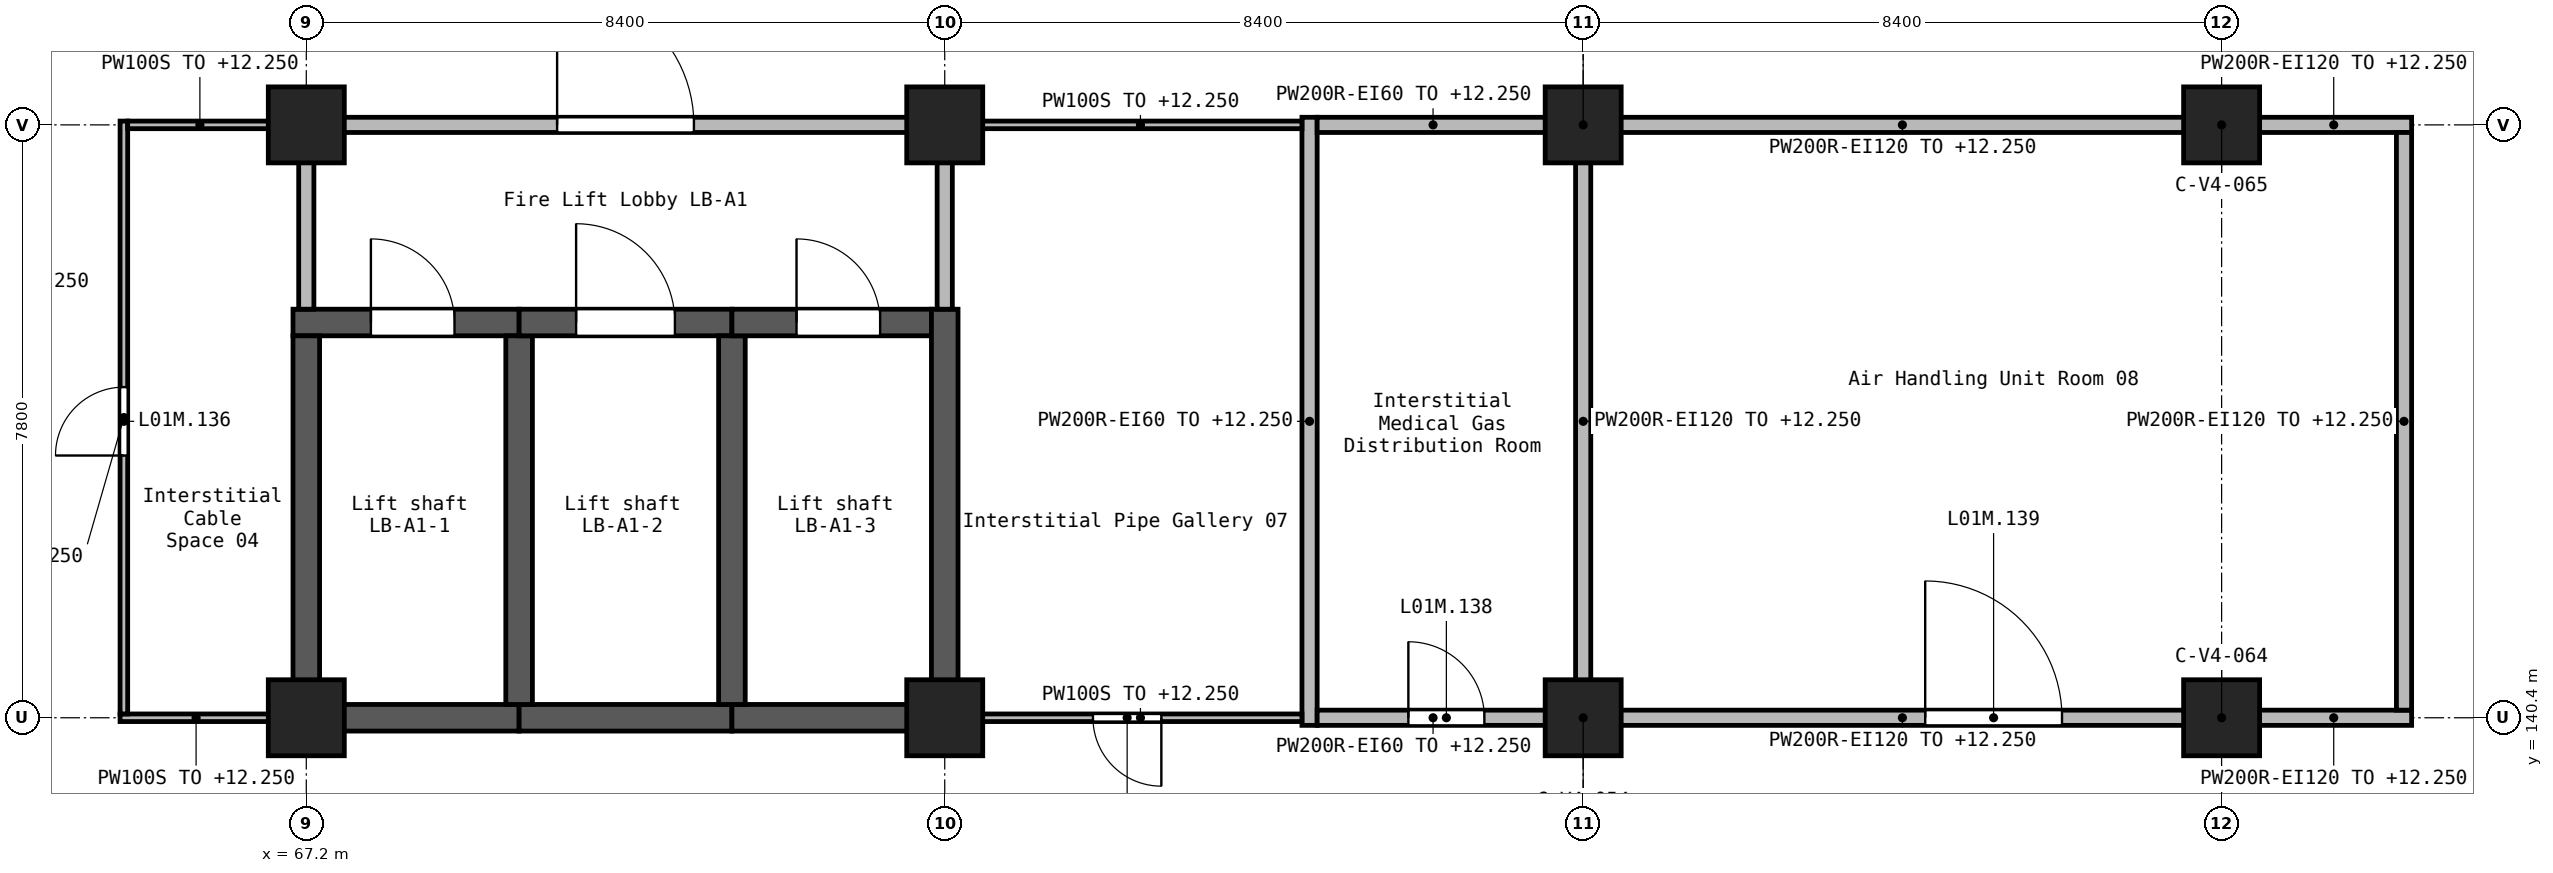
"""IFC4 building model, lengths in metres.
Left out: names, types, materials, properties, quantities, classifications, styles, units other than length and angle.
Written with IfcOpenShell. Run it as: python <this file> out.ifc"""

import sys

from ifc_helpers import new_model, si_unit, direction, frame, frame_2d, origin, origin_2d, place, context, subcontext, project, spatial, rectangle, extrude, element, fill, save


model = new_model("IFC4")
c1 = context("Model", 3, precision=1e-05, world=origin(), true_north=direction((0.0, 1.0)))
c2 = subcontext(c1, "Body", "Model", "MODEL_VIEW")
j1 = project(units=[si_unit("LENGTHUNIT", "METRE"), si_unit("PLANEANGLEUNIT", "RADIAN")], contexts=[c1])
p1 = place(None, origin())
s1 = spatial("IfcSite", under=j1, at=p1, CompositionType="ELEMENT")
p2 = place(p1, origin())
s2 = spatial("IfcBuilding", under=s1, at=p2, CompositionType="ELEMENT")
p3 = place(p2, frame((0.0, 0.0, 9.9)))
s3 = spatial("IfcBuildingStorey", under=s2, at=p3, CompositionType="ELEMENT", Elevation=9.9)
for number, where, z_axis, x_axis in (
    (1, (67.2, 140.4, 0.0), (0.0, 0.0, 1.0), (1.0, 0.0, 0.0)),
    (2, (67.2, 148.2, 0.0), (0.0, 0.0, 1.0), (1.0, 0.0, 0.0)),
    (3, (75.6, 140.4, 0.0), (0.0, 0.0, 1.0), (1.0, 0.0, 0.0)),
    (4, (75.6, 148.2, 0.0), (0.0, 0.0, 1.0), (1.0, 0.0, 0.0)),
    (5, (84.0, 140.4, 0.0), (0.0, 0.0, 1.0), (1.0, 0.0, 0.0)),
    (6, (84.0, 148.2, 0.0), (0.0, 0.0, 1.0), (1.0, 0.0, 0.0)),
    (7, (92.4, 140.4, 0.0), (0.0, 0.0, 1.0), (1.0, 0.0, 0.0)),
    (8, (92.4, 148.2, 0.0), (0.0, 0.0, 1.0), (1.0, 0.0, 0.0)),
):
    element("IfcColumn", number, at=place(p3, frame(where, z_axis=z_axis, x_axis=x_axis)), inside=s3, PredefinedType="COLUMN", context=c2, shape_type="SweptSolid", body=[
        extrude(rectangle(XDim=1.0, YDim=1.0, at=origin_2d()), origin(), (0.0, 0.0, 1.0), 2.7),
    ])
p4 = place(p3, frame((67.025, 145.6, 0.0), z_axis=(0.0, 0.0, 1.0), x_axis=(1.0, 0.0, 0.0)))
e9 = element("IfcWall", 9, at=p4, inside=s3, PredefinedType="SHEAR", context=c2, shape_type="SweptSolid", body=[
    extrude(rectangle(XDim=2.975, YDim=0.35, at=frame_2d((1.488, 0.0))), origin(), (0.0, 0.0, 1.0), 2.7),
])
p5 = place(p4, frame((1.025, 0.0, 0.0)))
e10 = element("IfcOpeningElement", 10, at=p5, cuts=e9, PredefinedType="OPENING", context=c2, shape_type="SweptSolid", body=[
    extrude(rectangle(XDim=1.1, YDim=2.1, at=frame_2d((0.55, 1.05))), frame((0.0, 0.185, 0.0), z_axis=(0.0, -1.0, 0.0), x_axis=(1.0, 0.0, 0.0)), (0.0, 0.0, 1.0), 0.37),
])
p6 = place(p3, frame((67.2, 140.225, 0.0), z_axis=(0.0, 0.0, 1.0), x_axis=(0.0, 1.0, 0.0)))
e11 = element("IfcWall", 11, at=p6, inside=s3, PredefinedType="SHEAR", context=c2, shape_type="SweptSolid", body=[
    extrude(rectangle(XDim=5.2, YDim=0.35, at=frame_2d((2.6, 0.0))), origin(), (0.0, 0.0, 1.0), 2.7),
])
p7 = place(p3, frame((67.375, 140.4, 0.0), z_axis=(0.0, 0.0, 1.0), x_axis=(1.0, 0.0, 0.0)))
e12 = element("IfcWall", 12, at=p7, inside=s3, PredefinedType="SHEAR", context=c2, shape_type="SweptSolid", body=[
    extrude(rectangle(XDim=2.625, YDim=0.35, at=frame_2d((1.312, 0.0))), origin(), (0.0, 0.0, 1.0), 2.7),
])
p8 = place(p3, frame((70.0, 140.4, 0.0), z_axis=(0.0, 0.0, 1.0), x_axis=(1.0, 0.0, 0.0)))
e13 = element("IfcWall", 13, at=p8, inside=s3, PredefinedType="SHEAR", context=c2, shape_type="SweptSolid", body=[
    extrude(rectangle(XDim=2.8, YDim=0.35, at=frame_2d((1.4, 0.0))), origin(), (0.0, 0.0, 1.0), 2.7),
])
p9 = place(p3, frame((70.0, 140.575, 0.0), z_axis=(0.0, 0.0, 1.0), x_axis=(0.0, 1.0, 0.0)))
e14 = element("IfcWall", 14, at=p9, inside=s3, PredefinedType="SHEAR", context=c2, shape_type="SweptSolid", body=[
    extrude(rectangle(XDim=4.85, YDim=0.35, at=frame_2d((2.425, 0.0))), origin(), (0.0, 0.0, 1.0), 2.7),
])
p10 = place(p3, frame((70.0, 145.6, 0.0), z_axis=(0.0, 0.0, 1.0), x_axis=(1.0, 0.0, 0.0)))
e15 = element("IfcWall", 15, at=p10, inside=s3, PredefinedType="SHEAR", context=c2, shape_type="SweptSolid", body=[
    extrude(rectangle(XDim=2.8, YDim=0.35, at=frame_2d((1.4, 0.0))), origin(), (0.0, 0.0, 1.0), 2.7),
])
p11 = place(p10, frame((0.75, 0.0, 0.0)))
e16 = element("IfcOpeningElement", 16, at=p11, cuts=e15, PredefinedType="OPENING", context=c2, shape_type="SweptSolid", body=[
    extrude(rectangle(XDim=1.3, YDim=2.1, at=frame_2d((0.65, 1.05))), frame((0.0, 0.185, 0.0), z_axis=(0.0, -1.0, 0.0), x_axis=(1.0, 0.0, 0.0)), (0.0, 0.0, 1.0), 0.37),
])
p12 = place(p3, frame((72.8, 140.4, 0.0), z_axis=(0.0, 0.0, 1.0), x_axis=(1.0, 0.0, 0.0)))
e17 = element("IfcWall", 17, at=p12, inside=s3, PredefinedType="SHEAR", context=c2, shape_type="SweptSolid", body=[
    extrude(rectangle(XDim=2.625, YDim=0.35, at=frame_2d((1.312, 0.0))), origin(), (0.0, 0.0, 1.0), 2.7),
])
p13 = place(p3, frame((72.8, 140.575, 0.0), z_axis=(0.0, 0.0, 1.0), x_axis=(0.0, 1.0, 0.0)))
e18 = element("IfcWall", 18, at=p13, inside=s3, PredefinedType="SHEAR", context=c2, shape_type="SweptSolid", body=[
    extrude(rectangle(XDim=4.85, YDim=0.35, at=frame_2d((2.425, 0.0))), origin(), (0.0, 0.0, 1.0), 2.7),
])
p14 = place(p3, frame((72.8, 145.6, 0.0), z_axis=(0.0, 0.0, 1.0), x_axis=(1.0, 0.0, 0.0)))
e19 = element("IfcWall", 19, at=p14, inside=s3, PredefinedType="SHEAR", context=c2, shape_type="SweptSolid", body=[
    extrude(rectangle(XDim=2.625, YDim=0.35, at=frame_2d((1.312, 0.0))), origin(), (0.0, 0.0, 1.0), 2.7),
])
p15 = place(p14, frame((0.85, 0.0, 0.0)))
e20 = element("IfcOpeningElement", 20, at=p15, cuts=e19, PredefinedType="OPENING", context=c2, shape_type="SweptSolid", body=[
    extrude(rectangle(XDim=1.1, YDim=2.1, at=frame_2d((0.55, 1.05))), frame((0.0, 0.185, 0.0), z_axis=(0.0, -1.0, 0.0), x_axis=(1.0, 0.0, 0.0)), (0.0, 0.0, 1.0), 0.37),
])
p16 = place(p3, frame((75.6, 140.225, 0.0), z_axis=(0.0, 0.0, 1.0), x_axis=(0.0, 1.0, 0.0)))
e21 = element("IfcWall", 21, at=p16, inside=s3, PredefinedType="SHEAR", context=c2, shape_type="SweptSolid", body=[
    extrude(rectangle(XDim=5.55, YDim=0.35, at=frame_2d((2.775, 0.0))), origin(), (0.0, 0.0, 1.0), 2.7),
])
p17 = place(p3, frame((84.45, 140.4, 0.0), z_axis=(0.0, 0.0, 1.0), x_axis=(1.0, 0.0, 0.0)))
e22 = element("IfcWall", 22, at=p17, inside=s3, PredefinedType="SOLIDWALL", context=c2, shape_type="SweptSolid", body=[
    extrude(rectangle(XDim=7.5, YDim=0.2, at=frame_2d((3.75, 0.0))), origin(), (0.0, 0.0, 1.0), 2.35),
])
p18 = place(p17, frame((4.05, 0.0, 0.0)))
e23 = element("IfcOpeningElement", 23, at=p18, cuts=e22, PredefinedType="OPENING", context=c2, shape_type="SweptSolid", body=[
    extrude(rectangle(XDim=1.8, YDim=2.1, at=frame_2d((0.9, 1.05))), frame((0.0, 0.11, 0.0), z_axis=(0.0, -1.0, 0.0), x_axis=(1.0, 0.0, 0.0)), (0.0, 0.0, 1.0), 0.22),
])
p19 = place(p3, frame((92.85, 140.4, 0.0), z_axis=(0.0, 0.0, 1.0), x_axis=(1.0, 0.0, 0.0)))
e24 = element("IfcWall", 24, at=p19, inside=s3, PredefinedType="SOLIDWALL", context=c2, shape_type="SweptSolid", body=[
    extrude(rectangle(XDim=2.05, YDim=0.2, at=frame_2d((1.025, 0.0))), origin(), (0.0, 0.0, 1.0), 2.35),
])
p20 = place(p3, frame((84.45, 148.2, 0.0), z_axis=(0.0, 0.0, 1.0), x_axis=(1.0, 0.0, 0.0)))
e25 = element("IfcWall", 25, at=p20, inside=s3, PredefinedType="SOLIDWALL", context=c2, shape_type="SweptSolid", body=[
    extrude(rectangle(XDim=7.5, YDim=0.2, at=frame_2d((3.75, 0.0))), origin(), (0.0, 0.0, 1.0), 2.35),
])
p21 = place(p3, frame((92.85, 148.2, 0.0), z_axis=(0.0, 0.0, 1.0), x_axis=(1.0, 0.0, 0.0)))
e26 = element("IfcWall", 26, at=p21, inside=s3, PredefinedType="SOLIDWALL", context=c2, shape_type="SweptSolid", body=[
    extrude(rectangle(XDim=2.05, YDim=0.2, at=frame_2d((1.025, 0.0))), origin(), (0.0, 0.0, 1.0), 2.35),
])
p22 = place(p3, frame((67.65, 148.2, 0.0), z_axis=(0.0, 0.0, 1.0), x_axis=(1.0, 0.0, 0.0)))
e27 = element("IfcWall", 27, at=p22, inside=s3, PredefinedType="SOLIDWALL", context=c2, shape_type="SweptSolid", body=[
    extrude(rectangle(XDim=7.5, YDim=0.2, at=frame_2d((3.75, 0.0))), origin(), (0.0, 0.0, 1.0), 2.35),
])
p23 = place(p22, frame((2.85, 0.0, 0.0)))
e28 = element("IfcOpeningElement", 28, at=p23, cuts=e27, PredefinedType="OPENING", context=c2, shape_type="SweptSolid", body=[
    extrude(rectangle(XDim=1.8, YDim=2.1, at=frame_2d((0.9, 1.05))), frame((0.0, 0.11, 0.0), z_axis=(0.0, -1.0, 0.0), x_axis=(1.0, 0.0, 0.0)), (0.0, 0.0, 1.0), 0.22),
])
p24 = place(p3, frame((80.4, 140.3, 0.0), z_axis=(0.0, 0.0, 1.0), x_axis=(0.0, 1.0, 0.0)))
e29 = element("IfcWall", 29, at=p24, inside=s3, PredefinedType="SOLIDWALL", context=c2, shape_type="SweptSolid", body=[
    extrude(rectangle(XDim=8.0, YDim=0.2, at=frame_2d((4.0, 0.0))), origin(), (0.0, 0.0, 1.0), 2.35),
])
p25 = place(p3, frame((84.0, 140.85, 0.0), z_axis=(0.0, 0.0, 1.0), x_axis=(0.0, 1.0, 0.0)))
e30 = element("IfcWall", 30, at=p25, inside=s3, PredefinedType="SOLIDWALL", context=c2, shape_type="SweptSolid", body=[
    extrude(rectangle(XDim=6.9, YDim=0.2, at=frame_2d((3.45, 0.0))), origin(), (0.0, 0.0, 1.0), 2.35),
])
p26 = place(p3, frame((94.8, 140.5, 0.0), z_axis=(0.0, 0.0, 1.0), x_axis=(0.0, 1.0, 0.0)))
e31 = element("IfcWall", 31, at=p26, inside=s3, PredefinedType="SOLIDWALL", context=c2, shape_type="SweptSolid", body=[
    extrude(rectangle(XDim=7.6, YDim=0.2, at=frame_2d((3.8, 0.0))), origin(), (0.0, 0.0, 1.0), 2.35),
])
p27 = place(p3, frame((80.5, 140.4, 0.0), z_axis=(0.0, 0.0, 1.0), x_axis=(1.0, 0.0, 0.0)))
e32 = element("IfcWall", 32, at=p27, inside=s3, PredefinedType="SOLIDWALL", context=c2, shape_type="SweptSolid", body=[
    extrude(rectangle(XDim=3.05, YDim=0.2, at=frame_2d((1.525, 0.0))), origin(), (0.0, 0.0, 1.0), 2.35),
])
p28 = place(p27, frame((1.2, 0.0, 0.0)))
e33 = element("IfcOpeningElement", 33, at=p28, cuts=e32, PredefinedType="OPENING", context=c2, shape_type="SweptSolid", body=[
    extrude(rectangle(XDim=1.0, YDim=2.1, at=frame_2d((0.5, 1.05))), frame((0.0, 0.11, 0.0), z_axis=(0.0, -1.0, 0.0), x_axis=(1.0, 0.0, 0.0)), (0.0, 0.0, 1.0), 0.22),
])
p29 = place(p3, frame((80.5, 148.2, 0.0), z_axis=(0.0, 0.0, 1.0), x_axis=(1.0, 0.0, 0.0)))
e34 = element("IfcWall", 34, at=p29, inside=s3, PredefinedType="SOLIDWALL", context=c2, shape_type="SweptSolid", body=[
    extrude(rectangle(XDim=3.05, YDim=0.2, at=frame_2d((1.525, 0.0))), origin(), (0.0, 0.0, 1.0), 2.35),
])
for number, where, z_axis, x_axis in (
    (35, (67.2, 145.775, 0.0), (0.0, 0.0, 1.0), (0.0, 1.0, 0.0)),
    (36, (75.6, 145.775, 0.0), (0.0, 0.0, 1.0), (0.0, 1.0, 0.0)),
):
    element("IfcWall", number, at=place(p3, frame(where, z_axis=z_axis, x_axis=x_axis)), inside=s3, PredefinedType="SOLIDWALL", context=c2, shape_type="SweptSolid", body=[
        extrude(rectangle(XDim=1.975, YDim=0.2, at=frame_2d((0.988, 0.0))), origin(), (0.0, 0.0, 1.0), 2.35),
    ])
p30 = place(p3, frame((80.3, 140.4, 0.0), z_axis=(0.0, 0.0, 1.0), x_axis=(-1.0, 0.0, 0.0)))
e37 = element("IfcWall", 37, at=p30, inside=s3, PredefinedType="PARTITIONING", context=c2, shape_type="SweptSolid", body=[
    extrude(rectangle(XDim=4.25, YDim=0.1, at=frame_2d((2.125, 0.0))), origin(), (0.0, 0.0, 1.0), 2.35),
])
p31 = place(p30, frame((1.85, 0.0, 0.0)))
e38 = element("IfcOpeningElement", 38, at=p31, cuts=e37, PredefinedType="OPENING", context=c2, shape_type="SweptSolid", body=[
    extrude(rectangle(XDim=0.9, YDim=2.1, at=frame_2d((0.45, 1.05))), frame((0.0, 0.06, 0.0), z_axis=(0.0, -1.0, 0.0), x_axis=(1.0, 0.0, 0.0)), (0.0, 0.0, 1.0), 0.12),
])
p32 = place(p3, frame((66.75, 140.4, 0.0), z_axis=(0.0, 0.0, 1.0), x_axis=(-1.0, 0.0, 0.0)))
e39 = element("IfcWall", 39, at=p32, inside=s3, PredefinedType="PARTITIONING", context=c2, shape_type="SweptSolid", body=[
    extrude(rectangle(XDim=2.0, YDim=0.1, at=frame_2d((1.0, 0.0))), origin(), (0.0, 0.0, 1.0), 2.35),
])
p33 = place(p3, frame((64.8, 140.45, 0.0), z_axis=(0.0, 0.0, 1.0), x_axis=(0.0, 1.0, 0.0)))
e40 = element("IfcWall", 40, at=p33, inside=s3, PredefinedType="PARTITIONING", context=c2, shape_type="SweptSolid", body=[
    extrude(rectangle(XDim=7.8, YDim=0.1, at=frame_2d((3.9, 0.0))), origin(), (0.0, 0.0, 1.0), 2.35),
])
p34 = place(p33, frame((3.4, 0.0, 0.0)))
e41 = element("IfcOpeningElement", 41, at=p34, cuts=e40, PredefinedType="OPENING", context=c2, shape_type="SweptSolid", body=[
    extrude(rectangle(XDim=0.9, YDim=2.1, at=frame_2d((0.45, 1.05))), frame((0.0, 0.06, 0.0), z_axis=(0.0, -1.0, 0.0), x_axis=(1.0, 0.0, 0.0)), (0.0, 0.0, 1.0), 0.12),
])
p35 = place(p3, frame((76.05, 148.2, 0.0), z_axis=(0.0, 0.0, 1.0), x_axis=(1.0, 0.0, 0.0)))
e42 = element("IfcWall", 42, at=p35, inside=s3, PredefinedType="PARTITIONING", context=c2, shape_type="SweptSolid", body=[
    extrude(rectangle(XDim=4.25, YDim=0.1, at=frame_2d((2.125, 0.0))), origin(), (0.0, 0.0, 1.0), 2.35),
])
p36 = place(p3, frame((64.85, 148.2, 0.0), z_axis=(0.0, 0.0, 1.0), x_axis=(1.0, 0.0, 0.0)))
e43 = element("IfcWall", 43, at=p36, inside=s3, PredefinedType="PARTITIONING", context=c2, shape_type="SweptSolid", body=[
    extrude(rectangle(XDim=1.9, YDim=0.1, at=frame_2d((0.95, 0.0))), origin(), (0.0, 0.0, 1.0), 2.35),
])
p37 = place(p23, frame((1.8, 0.0, 0.0), z_axis=(0.0, 0.0, 1.0), x_axis=(-1.0, 0.0, 0.0)))
e44 = element("IfcDoor", 44, at=p37, inside=s3, OperationType="DOUBLE_DOOR_SINGLE_SWING", PredefinedType="DOOR", context=c2, shape_type="SweptSolid", body=[
    extrude(rectangle(XDim=1.8, YDim=2.1, at=frame_2d((0.9, 1.05))), frame((0.0, 0.025, 0.0), z_axis=(0.0, -1.0, 0.0), x_axis=(1.0, 0.0, 0.0)), (0.0, 0.0, 1.0), 0.05),
])
fill(e28, e44)
p38 = place(p34, frame((0.9, 0.0, 0.0), z_axis=(0.0, 0.0, 1.0), x_axis=(-1.0, 0.0, 0.0)))
e45 = element("IfcDoor", 45, at=p38, inside=s3, OperationType="SINGLE_SWING_RIGHT", PredefinedType="DOOR", context=c2, shape_type="SweptSolid", body=[
    extrude(rectangle(XDim=0.9, YDim=2.1, at=frame_2d((0.45, 1.05))), frame((0.0, 0.025, 0.0), z_axis=(0.0, -1.0, 0.0), x_axis=(1.0, 0.0, 0.0)), (0.0, 0.0, 1.0), 0.05),
])
fill(e41, e45)
p39 = place(p31, frame((0.9, 0.0, 0.0), z_axis=(0.0, 0.0, 1.0), x_axis=(-1.0, 0.0, 0.0)))
e46 = element("IfcDoor", 46, at=p39, inside=s3, OperationType="SINGLE_SWING_LEFT", PredefinedType="DOOR", context=c2, shape_type="SweptSolid", body=[
    extrude(rectangle(XDim=0.9, YDim=2.1, at=frame_2d((0.45, 1.05))), frame((0.0, 0.025, 0.0), z_axis=(0.0, -1.0, 0.0), x_axis=(1.0, 0.0, 0.0)), (0.0, 0.0, 1.0), 0.05),
])
fill(e38, e46)
p40 = place(p28, origin())
e47 = element("IfcDoor", 47, at=p40, inside=s3, OperationType="SINGLE_SWING_RIGHT", PredefinedType="DOOR", context=c2, shape_type="SweptSolid", body=[
    extrude(rectangle(XDim=1.0, YDim=2.1, at=frame_2d((0.5, 1.05))), frame((0.0, 0.025, 0.0), z_axis=(0.0, -1.0, 0.0), x_axis=(1.0, 0.0, 0.0)), (0.0, 0.0, 1.0), 0.05),
])
fill(e33, e47)
p41 = place(p18, origin())
e48 = element("IfcDoor", 48, at=p41, inside=s3, OperationType="DOUBLE_DOOR_SINGLE_SWING", PredefinedType="DOOR", context=c2, shape_type="SweptSolid", body=[
    extrude(rectangle(XDim=1.8, YDim=2.1, at=frame_2d((0.9, 1.05))), frame((0.0, 0.025, 0.0), z_axis=(0.0, -1.0, 0.0), x_axis=(1.0, 0.0, 0.0)), (0.0, 0.0, 1.0), 0.05),
])
fill(e23, e48)
p42 = place(p5, origin())
e49 = element("IfcDoor", 49, at=p42, inside=s3, OperationType="DOUBLE_DOOR_SLIDING", PredefinedType="DOOR", context=c2, shape_type="SweptSolid", body=[
    extrude(rectangle(XDim=1.1, YDim=2.1, at=frame_2d((0.55, 1.05))), frame((0.0, 0.025, 0.0), z_axis=(0.0, -1.0, 0.0), x_axis=(1.0, 0.0, 0.0)), (0.0, 0.0, 1.0), 0.05),
])
fill(e10, e49)
p43 = place(p11, origin())
e50 = element("IfcDoor", 50, at=p43, inside=s3, OperationType="DOUBLE_DOOR_SLIDING", PredefinedType="DOOR", context=c2, shape_type="SweptSolid", body=[
    extrude(rectangle(XDim=1.3, YDim=2.1, at=frame_2d((0.65, 1.05))), frame((0.0, 0.025, 0.0), z_axis=(0.0, -1.0, 0.0), x_axis=(1.0, 0.0, 0.0)), (0.0, 0.0, 1.0), 0.05),
])
fill(e16, e50)
p44 = place(p15, origin())
e51 = element("IfcDoor", 51, at=p44, inside=s3, OperationType="DOUBLE_DOOR_SLIDING", PredefinedType="DOOR", context=c2, shape_type="SweptSolid", body=[
    extrude(rectangle(XDim=1.1, YDim=2.1, at=frame_2d((0.55, 1.05))), frame((0.0, 0.025, 0.0), z_axis=(0.0, -1.0, 0.0), x_axis=(1.0, 0.0, 0.0)), (0.0, 0.0, 1.0), 0.05),
])
fill(e20, e51)
save(model, sys.argv[1])
